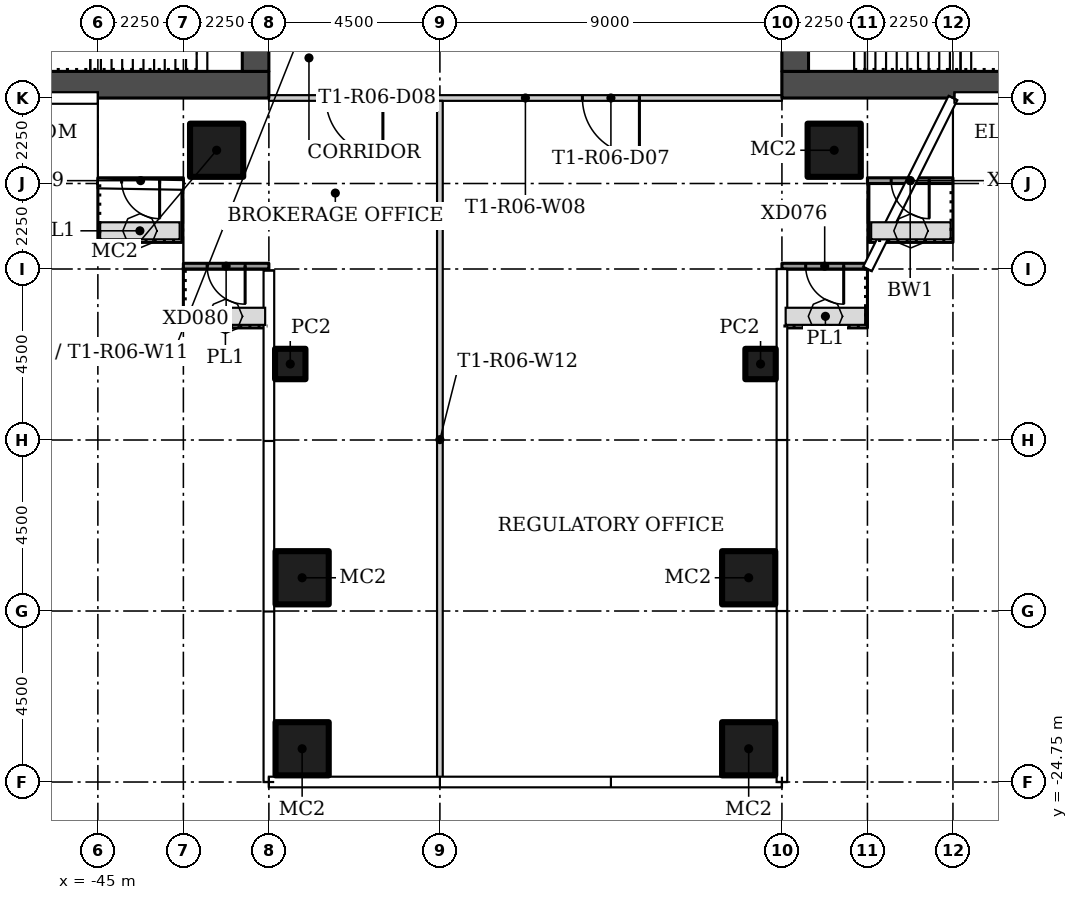
"""IFC4 building model, lengths in metres.
Left out: names, types, materials, properties, quantities, classifications, styles, units other than length and angle.
Written with IfcOpenShell. Run it as: python <this file> out.ifc"""

import sys

from ifc_helpers import new_model, si_unit, direction, frame, frame_2d, origin, origin_2d, place, context, subcontext, project, spatial, rectangle, hollow_rectangle, extrude, element, fill, save


model = new_model("IFC4")
c1 = context("Model", 3, precision=1e-05, world=origin(), true_north=direction((0.0, 1.0)))
c2 = subcontext(c1, "Body", "Model", "MODEL_VIEW")
j1 = project(units=[si_unit("LENGTHUNIT", "METRE"), si_unit("PLANEANGLEUNIT", "RADIAN")], contexts=[c1])
p1 = place(None, origin())
s1 = spatial("IfcSite", under=j1, at=p1, CompositionType="ELEMENT")
p2 = place(p1, origin())
s2 = spatial("IfcBuilding", under=s1, at=p2, CompositionType="ELEMENT")
p3 = place(p2, frame((0.0, 0.0, 61.5)))
s3 = spatial("IfcBuildingStorey", under=s2, at=p3, CompositionType="ELEMENT", Elevation=61.5)
for number, where in (
    (1, (-25.625, -8.125, 0.0)),
    (2, (-41.875, -8.125, 0.0)),
):
    element("IfcColumn", number, at=place(p3, frame(where)), inside=s3, PredefinedType="COLUMN", context=c2, shape_type="SweptSolid", body=[
        extrude(hollow_rectangle(XDim=1.4, YDim=1.4, WallThickness=0.05, at=origin_2d()), origin(), (0.0, 0.0, 1.0), 3.55),
    ])
p4 = place(p3, frame((-39.938, -13.75, 0.0)))
e3 = element("IfcColumn", 3, at=p4, inside=s3, PredefinedType="COLUMN", context=c2, shape_type="SweptSolid", body=[
    extrude(hollow_rectangle(XDim=0.8, YDim=0.8, WallThickness=0.025, at=origin_2d()), origin(), (0.0, 0.0, 1.0), 3.55),
])
for number, where in (
    (4, (-39.625, -19.375, 0.0)),
    (5, (-39.625, -23.875, 0.0)),
):
    element("IfcColumn", number, at=place(p3, frame(where)), inside=s3, PredefinedType="COLUMN", context=c2, shape_type="SweptSolid", body=[
        extrude(hollow_rectangle(XDim=1.4, YDim=1.4, WallThickness=0.05, at=origin_2d()), origin(), (0.0, 0.0, 1.0), 3.55),
    ])
p5 = place(p3, frame((-27.562, -13.75, 0.0)))
e6 = element("IfcColumn", 6, at=p5, inside=s3, PredefinedType="COLUMN", context=c2, shape_type="SweptSolid", body=[
    extrude(hollow_rectangle(XDim=0.8, YDim=0.8, WallThickness=0.025, at=origin_2d()), origin(), (0.0, 0.0, 1.0), 3.55),
])
for number, where in (
    (7, (-27.875, -19.375, 0.0)),
    (8, (-27.875, -23.875, 0.0)),
):
    element("IfcColumn", number, at=place(p3, frame(where)), inside=s3, PredefinedType="COLUMN", context=c2, shape_type="SweptSolid", body=[
        extrude(hollow_rectangle(XDim=1.4, YDim=1.4, WallThickness=0.05, at=origin_2d()), origin(), (0.0, 0.0, 1.0), 3.55),
    ])
p6 = place(p3, frame((-27.0, -6.75, 0.0), z_axis=(0.0, 0.0, 1.0), x_axis=(-1.0, 0.0, 0.0)))
e9 = element("IfcWall", 9, at=p6, inside=s3, PredefinedType="PARTITIONING", context=c2, shape_type="SweptSolid", body=[
    extrude(rectangle(XDim=13.5, YDim=0.15, at=frame_2d((6.75, 0.0))), origin(), (0.0, 0.0, 1.0), 3.55),
])
p7 = place(p6, frame((3.75, 0.0, 0.0)))
e10 = element("IfcOpeningElement", 10, at=p7, cuts=e9, PredefinedType="OPENING", context=c2, shape_type="SweptSolid", body=[
    extrude(rectangle(XDim=1.5, YDim=2.1, at=frame_2d((0.75, 1.05))), frame((0.0, 0.085, 0.0), z_axis=(0.0, -1.0, 0.0), x_axis=(1.0, 0.0, 0.0)), (0.0, 0.0, 1.0), 0.17),
])
p8 = place(p6, frame((10.5, 0.0, 0.0)))
e11 = element("IfcOpeningElement", 11, at=p8, cuts=e9, PredefinedType="OPENING", context=c2, shape_type="SweptSolid", body=[
    extrude(rectangle(XDim=1.5, YDim=2.1, at=frame_2d((0.75, 1.05))), frame((0.0, 0.085, 0.0), z_axis=(0.0, -1.0, 0.0), x_axis=(1.0, 0.0, 0.0)), (0.0, 0.0, 1.0), 0.17),
])
p9 = place(p3, frame((-36.0, -24.655, 0.0), z_axis=(0.0, 0.0, 1.0), x_axis=(0.0, 1.0, 0.0)))
e12 = element("IfcWall", 12, at=p9, inside=s3, PredefinedType="PARTITIONING", context=c2, shape_type="SweptSolid", body=[
    extrude(rectangle(XDim=17.83, YDim=0.15, at=frame_2d((8.915, 0.0))), origin(), (0.0, 0.0, 1.0), 3.55),
])
p10 = place(p3, frame((-22.5, -8.925, 0.0), z_axis=(0.0, 0.0, 1.0), x_axis=(-1.0, 0.0, 0.0)))
e13 = element("IfcWall", 13, at=p10, inside=s3, PredefinedType="SOLIDWALL", context=c2, shape_type="SweptSolid", body=[
    extrude(rectangle(XDim=2.25, YDim=0.15, at=frame_2d((1.125, 0.0))), origin(), (0.0, 0.0, 1.0), 3.45),
])
p11 = place(p10, frame((0.625, 0.0, 0.0)))
e14 = element("IfcOpeningElement", 14, at=p11, cuts=e13, PredefinedType="OPENING", context=c2, shape_type="SweptSolid", body=[
    extrude(rectangle(XDim=1.0, YDim=2.4, at=frame_2d((0.5, 1.2))), frame((0.0, 0.085, 0.0), z_axis=(0.0, -1.0, 0.0), x_axis=(1.0, 0.0, 0.0)), (0.0, 0.0, 1.0), 0.17),
])
p12 = place(p3, frame((-24.75, -11.175, 0.0), z_axis=(0.0, 0.0, 1.0), x_axis=(-1.0, 0.0, 0.0)))
e15 = element("IfcWall", 15, at=p12, inside=s3, PredefinedType="SOLIDWALL", context=c2, shape_type="SweptSolid", body=[
    extrude(rectangle(XDim=2.25, YDim=0.15, at=frame_2d((1.125, 0.0))), origin(), (0.0, 0.0, 1.0), 3.45),
])
p13 = place(p12, frame((0.625, 0.0, 0.0)))
e16 = element("IfcOpeningElement", 16, at=p13, cuts=e15, PredefinedType="OPENING", context=c2, shape_type="SweptSolid", body=[
    extrude(rectangle(XDim=1.0, YDim=2.4, at=frame_2d((0.5, 1.2))), frame((0.0, 0.085, 0.0), z_axis=(0.0, -1.0, 0.0), x_axis=(1.0, 0.0, 0.0)), (0.0, 0.0, 1.0), 0.17),
])
p14 = place(p3, frame((-42.75, -8.925, 0.0), z_axis=(0.0, 0.0, 1.0), x_axis=(-1.0, 0.0, 0.0)))
e17 = element("IfcWall", 17, at=p14, inside=s3, PredefinedType="SOLIDWALL", context=c2, shape_type="SweptSolid", body=[
    extrude(rectangle(XDim=2.25, YDim=0.15, at=frame_2d((1.125, 0.0))), origin(), (0.0, 0.0, 1.0), 3.45),
])
p15 = place(p14, frame((0.625, 0.0, 0.0)))
e18 = element("IfcOpeningElement", 18, at=p15, cuts=e17, PredefinedType="OPENING", context=c2, shape_type="SweptSolid", body=[
    extrude(rectangle(XDim=1.0, YDim=2.4, at=frame_2d((0.5, 1.2))), frame((0.0, 0.085, 0.0), z_axis=(0.0, -1.0, 0.0), x_axis=(1.0, 0.0, 0.0)), (0.0, 0.0, 1.0), 0.17),
])
p16 = place(p3, frame((-40.5, -11.175, 0.0), z_axis=(0.0, 0.0, 1.0), x_axis=(-1.0, 0.0, 0.0)))
e19 = element("IfcWall", 19, at=p16, inside=s3, PredefinedType="SOLIDWALL", context=c2, shape_type="SweptSolid", body=[
    extrude(rectangle(XDim=2.25, YDim=0.15, at=frame_2d((1.125, 0.0))), origin(), (0.0, 0.0, 1.0), 3.45),
])
p17 = place(p16, frame((0.625, 0.0, 0.0)))
e20 = element("IfcOpeningElement", 20, at=p17, cuts=e19, PredefinedType="OPENING", context=c2, shape_type="SweptSolid", body=[
    extrude(rectangle(XDim=1.0, YDim=2.4, at=frame_2d((0.5, 1.2))), frame((0.0, 0.085, 0.0), z_axis=(0.0, -1.0, 0.0), x_axis=(1.0, 0.0, 0.0)), (0.0, 0.0, 1.0), 0.17),
])
p18 = place(p3, frame((-27.0, -6.4, 0.0)))
e21 = element("IfcWall", 21, at=p18, inside=s3, PredefinedType="SHEAR", context=c2, shape_type="SweptSolid", body=[
    extrude(rectangle(XDim=13.5, YDim=0.7, at=frame_2d((6.75, 0.0))), origin(), (0.0, 0.0, 1.0), 3.55),
])
p19 = place(p3, frame((-26.65, 6.05, 0.0), z_axis=(0.0, 0.0, 1.0), x_axis=(0.0, -1.0, 0.0)))
e22 = element("IfcWall", 22, at=p19, inside=s3, PredefinedType="SHEAR", context=c2, shape_type="SweptSolid", body=[
    extrude(rectangle(XDim=12.1, YDim=0.7, at=frame_2d((6.05, 0.0))), origin(), (0.0, 0.0, 1.0), 3.55),
])
p20 = place(p19, frame((3.9, 0.0, 0.0)))
e23 = element("IfcOpeningElement", 23, at=p20, cuts=e22, PredefinedType="OPENING", context=c2, shape_type="SweptSolid", body=[
    extrude(rectangle(XDim=1.8, YDim=2.4, at=frame_2d((0.9, 1.2))), frame((0.0, 0.36, 0.0), z_axis=(0.0, -1.0, 0.0), x_axis=(1.0, 0.0, 0.0)), (0.0, 0.0, 1.0), 0.72),
])
p21 = place(p3, frame((-40.5, -6.4, 0.0), z_axis=(0.0, 0.0, 1.0), x_axis=(-1.0, 0.0, 0.0)))
e24 = element("IfcWall", 24, at=p21, inside=s3, PredefinedType="SHEAR", context=c2, shape_type="SweptSolid", body=[
    extrude(rectangle(XDim=13.5, YDim=0.7, at=frame_2d((6.75, 0.0))), origin(), (0.0, 0.0, 1.0), 3.55),
])
p22 = place(p3, frame((-40.85, -6.05, 0.0), z_axis=(0.0, 0.0, 1.0), x_axis=(0.0, 1.0, 0.0)))
e25 = element("IfcWall", 25, at=p22, inside=s3, PredefinedType="SHEAR", context=c2, shape_type="SweptSolid", body=[
    extrude(rectangle(XDim=12.1, YDim=0.7, at=frame_2d((6.05, 0.0))), origin(), (0.0, 0.0, 1.0), 3.55),
])
p23 = place(p22, frame((6.4, 0.0, 0.0)))
e26 = element("IfcOpeningElement", 26, at=p23, cuts=e25, PredefinedType="OPENING", context=c2, shape_type="SweptSolid", body=[
    extrude(rectangle(XDim=1.8, YDim=2.4, at=frame_2d((0.9, 1.2))), frame((0.0, 0.36, 0.0), z_axis=(0.0, -1.0, 0.0), x_axis=(1.0, 0.0, 0.0)), (0.0, 0.0, 1.0), 0.72),
])
p24 = place(p7, origin())
e27 = element("IfcDoor", 27, at=p24, inside=s3, OperationType="DOUBLE_DOOR_SINGLE_SWING", PredefinedType="DOOR", context=c2, shape_type="SweptSolid", body=[
    extrude(rectangle(XDim=1.5, YDim=2.1, at=frame_2d((0.75, 1.05))), frame((0.0, 0.025, 0.0), z_axis=(0.0, -1.0, 0.0), x_axis=(1.0, 0.0, 0.0)), (0.0, 0.0, 1.0), 0.05),
])
fill(e10, e27)
p25 = place(p8, origin())
e28 = element("IfcDoor", 28, at=p25, inside=s3, OperationType="DOUBLE_DOOR_SINGLE_SWING", PredefinedType="DOOR", context=c2, shape_type="SweptSolid", body=[
    extrude(rectangle(XDim=1.5, YDim=2.1, at=frame_2d((0.75, 1.05))), frame((0.0, 0.025, 0.0), z_axis=(0.0, -1.0, 0.0), x_axis=(1.0, 0.0, 0.0)), (0.0, 0.0, 1.0), 0.05),
])
fill(e11, e28)
p26 = place(p11, origin())
e29 = element("IfcDoor", 29, at=p26, inside=s3, OperationType="SINGLE_SWING_RIGHT", PredefinedType="DOOR", context=c2, shape_type="SweptSolid", body=[
    extrude(rectangle(XDim=1.0, YDim=2.4, at=frame_2d((0.5, 1.2))), frame((0.0, 0.025, 0.0), z_axis=(0.0, -1.0, 0.0), x_axis=(1.0, 0.0, 0.0)), (0.0, 0.0, 1.0), 0.05),
])
fill(e14, e29)
p27 = place(p13, origin())
e30 = element("IfcDoor", 30, at=p27, inside=s3, OperationType="SINGLE_SWING_LEFT", PredefinedType="DOOR", context=c2, shape_type="SweptSolid", body=[
    extrude(rectangle(XDim=1.0, YDim=2.4, at=frame_2d((0.5, 1.2))), frame((0.0, 0.025, 0.0), z_axis=(0.0, -1.0, 0.0), x_axis=(1.0, 0.0, 0.0)), (0.0, 0.0, 1.0), 0.05),
])
fill(e16, e30)
p28 = place(p15, origin())
e31 = element("IfcDoor", 31, at=p28, inside=s3, OperationType="SINGLE_SWING_LEFT", PredefinedType="DOOR", context=c2, shape_type="SweptSolid", body=[
    extrude(rectangle(XDim=1.0, YDim=2.4, at=frame_2d((0.5, 1.2))), frame((0.0, 0.025, 0.0), z_axis=(0.0, -1.0, 0.0), x_axis=(1.0, 0.0, 0.0)), (0.0, 0.0, 1.0), 0.05),
])
fill(e18, e31)
p29 = place(p17, origin())
e32 = element("IfcDoor", 32, at=p29, inside=s3, OperationType="SINGLE_SWING_RIGHT", PredefinedType="DOOR", context=c2, shape_type="SweptSolid", body=[
    extrude(rectangle(XDim=1.0, YDim=2.4, at=frame_2d((0.5, 1.2))), frame((0.0, 0.025, 0.0), z_axis=(0.0, -1.0, 0.0), x_axis=(1.0, 0.0, 0.0)), (0.0, 0.0, 1.0), 0.05),
])
fill(e20, e32)
save(model, sys.argv[1])
